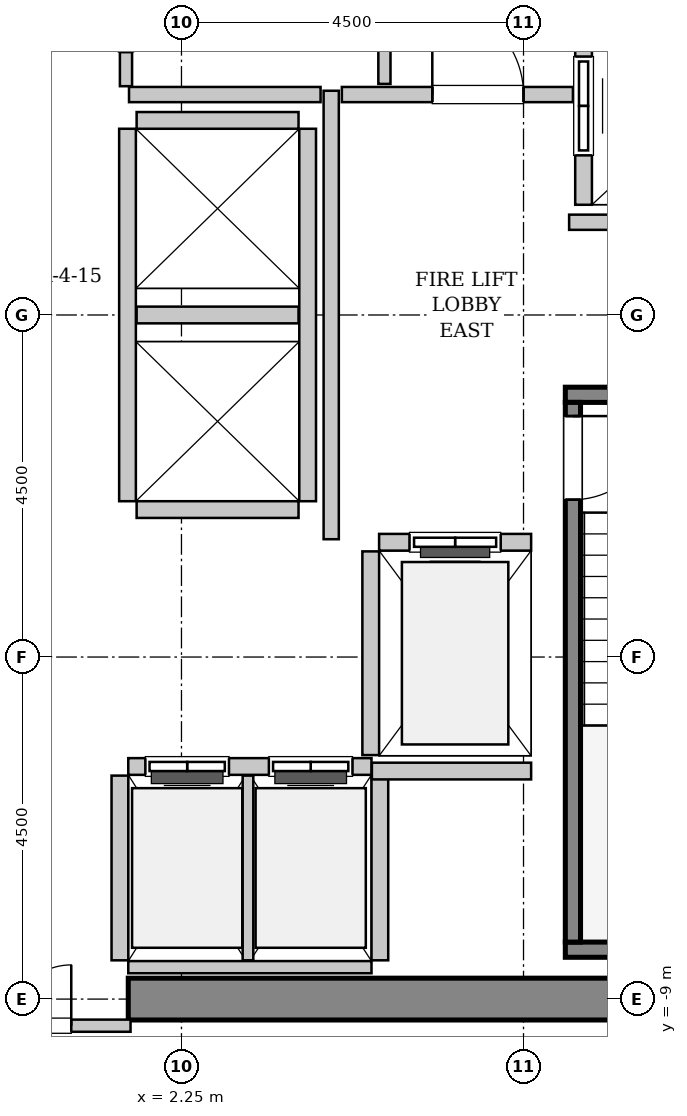
"""IFC4 building model, lengths in metres.
Left out: names, types, materials, properties, quantities, classifications, styles, units other than length and angle.
Written with IfcOpenShell. Run it as: python <this file> out.ifc"""

import sys

from ifc_helpers import new_model, si_unit, direction, frame, frame_2d, origin, place, context, subcontext, project, spatial, rectangle, extrude, source, transform, mapped, element, fill, save


model = new_model("IFC4")
c1 = context("Model", 3, precision=1e-05, world=origin(), true_north=direction((0.0, 1.0)))
c2 = subcontext(c1, "Body", "Model", "MODEL_VIEW")
j1 = project(units=[si_unit("LENGTHUNIT", "METRE"), si_unit("PLANEANGLEUNIT", "RADIAN")], contexts=[c1])
p1 = place(None, origin())
s1 = spatial("IfcSite", under=j1, at=p1, CompositionType="ELEMENT")
p2 = place(p1, origin())
s2 = spatial("IfcBuilding", under=s1, at=p2, CompositionType="ELEMENT")
p3 = place(p2, frame((0.0, 0.0, 171.6)))
s3 = spatial("IfcBuildingStorey", under=s2, at=p3, CompositionType="ELEMENT", Elevation=171.6)
m1 = source(origin(), c2, "Body", "SweptSolid", [
    extrude(rectangle(XDim=9.975, YDim=0.55, at=frame_2d((4.987, 0.0))), origin(), (0.0, 0.0, 1.0), 3.8),
])
p4 = place(p3, frame((1.55, -9.0, 0.0), z_axis=(0.0, 0.0, 1.0), x_axis=(1.0, 0.0, 0.0)))
e1 = element("IfcWall", 1, at=p4, inside=s3, PredefinedType="SHEAR", context=c2, shape_type="MappedRepresentation", body=[
    mapped(m1, transform((0.0, 0.0, 0.0), x_axis=(1.0, 0.0, 0.0), y_axis=(0.0, 1.0, 0.0), z_axis=(0.0, 0.0, 1.0), scale=1.0)),
])
m2 = source(origin(), c2, "Body", "SweptSolid", [
    extrude(rectangle(XDim=3.4, YDim=0.2, at=frame_2d((1.7, 0.0))), origin(), (0.0, 0.0, 1.0), 3.8),
])
p5 = place(p3, frame((7.3, -1.05, 0.0), z_axis=(0.0, 0.0, 1.0), x_axis=(1.0, 0.0, 0.0)))
e2 = element("IfcWall", 2, at=p5, inside=s3, PredefinedType="SOLIDWALL", context=c2, shape_type="MappedRepresentation", body=[
    mapped(m2, transform((0.0, 0.0, 0.0), x_axis=(1.0, 0.0, 0.0), y_axis=(0.0, 1.0, 0.0), z_axis=(0.0, 0.0, 1.0), scale=1.0)),
])
m3 = source(origin(), c2, "Body", "SweptSolid", [
    extrude(rectangle(XDim=3.68, YDim=0.2, at=frame_2d((1.84, 0.0))), origin(), (0.0, 0.0, 1.0), 3.8),
])
p6 = place(p3, frame((7.3, -8.35, 0.0), z_axis=(0.0, 0.0, 1.0), x_axis=(1.0, 0.0, 0.0)))
e3 = element("IfcWall", 3, at=p6, inside=s3, PredefinedType="SOLIDWALL", context=c2, shape_type="MappedRepresentation", body=[
    mapped(m3, transform((0.0, 0.0, 0.0), x_axis=(1.0, 0.0, 0.0), y_axis=(0.0, 1.0, 0.0), z_axis=(0.0, 0.0, 1.0), scale=1.0)),
])
m4 = source(origin(), c2, "Body", "SweptSolid", [
    extrude(rectangle(XDim=7.1, YDim=0.2, at=frame_2d((3.55, 0.0))), origin(), (0.0, 0.0, 1.0), 3.8),
])
p7 = place(p3, frame((7.4, -1.15, 0.0), z_axis=(0.0, 0.0, 1.0), x_axis=(0.0, -1.0, 0.0)))
e4 = element("IfcWall", 4, at=p7, inside=s3, PredefinedType="SOLIDWALL", context=c2, shape_type="MappedRepresentation", body=[
    mapped(m4, transform((0.0, 0.0, 0.0), x_axis=(1.0, 0.0, 0.0), y_axis=(0.0, 1.0, 0.0), z_axis=(0.0, 0.0, 1.0), scale=1.0)),
])
p8 = place(p7, frame((0.18, 0.0, 0.0)))
e5 = element("IfcOpeningElement", 5, at=p8, cuts=e4, PredefinedType="OPENING", context=c2, shape_type="SweptSolid", body=[
    extrude(rectangle(XDim=1.1, YDim=2.15, at=frame_2d((0.55, 1.075))), frame((0.0, 0.11, 0.0), z_axis=(0.0, -1.0, 0.0), x_axis=(1.0, 0.0, 0.0)), (0.0, 0.0, 1.0), 0.22),
])
m5 = source(origin(), c2, "Body", "SweptSolid", [
    extrude(rectangle(XDim=2.0, YDim=0.22, at=frame_2d((1.0, 0.0))), origin(), (0.0, 0.0, 1.0), 3.535),
])
p9 = place(p3, frame((6.85, -2.99, 0.0), z_axis=(0.0, 0.0, 1.0), x_axis=(-1.0, 0.0, 0.0)))
e6 = element("IfcWall", 6, at=p9, inside=s3, PredefinedType="SOLIDWALL", context=c2, shape_type="MappedRepresentation", body=[
    mapped(m5, transform((0.0, 0.0, 0.0), x_axis=(1.0, 0.0, 0.0), y_axis=(0.0, 1.0, 0.0), z_axis=(0.0, 0.0, 1.0), scale=1.0)),
])
p10 = place(p9, frame((0.4, 0.0, 0.0)))
e7 = element("IfcOpeningElement", 7, at=p10, cuts=e6, PredefinedType="OPENING", context=c2, shape_type="SweptSolid", body=[
    extrude(rectangle(XDim=1.2, YDim=2.2, at=frame_2d((0.6, 1.1))), frame((0.0, 0.12, 0.0), z_axis=(0.0, -1.0, 0.0), x_axis=(1.0, 0.0, 0.0)), (0.0, 0.0, 1.0), 0.24),
])
m6 = source(origin(), c2, "Body", "SweptSolid", [
    extrude(rectangle(XDim=2.68, YDim=0.22, at=frame_2d((1.34, 0.0))), origin(), (0.0, 0.0, 1.0), 3.535),
])
p11 = place(p3, frame((4.74, -3.11, 0.0), z_axis=(0.0, 0.0, 1.0), x_axis=(0.0, -1.0, 0.0)))
e8 = element("IfcWall", 8, at=p11, inside=s3, PredefinedType="SOLIDWALL", context=c2, shape_type="MappedRepresentation", body=[
    mapped(m6, transform((0.0, 0.0, 0.0), x_axis=(1.0, 0.0, 0.0), y_axis=(0.0, 1.0, 0.0), z_axis=(0.0, 0.0, 1.0), scale=1.0)),
])
m7 = source(origin(), c2, "Body", "SweptSolid", [
    extrude(rectangle(XDim=5.45, YDim=0.22, at=frame_2d((2.725, 0.0))), origin(), (0.0, 0.0, 1.0), 3.535),
])
p12 = place(p3, frame((7.54, 6.9, 0.0), z_axis=(0.0, 0.0, 1.0), x_axis=(0.0, -1.0, 0.0)))
e9 = element("IfcWall", 9, at=p12, inside=s3, PredefinedType="SOLIDWALL", context=c2, shape_type="MappedRepresentation", body=[
    mapped(m7, transform((0.0, 0.0, 0.0), x_axis=(1.0, 0.0, 0.0), y_axis=(0.0, 1.0, 0.0), z_axis=(0.0, 0.0, 1.0), scale=1.0)),
])
p13 = place(p12, frame((3.5, 0.0, 0.0)))
e10 = element("IfcOpeningElement", 10, at=p13, cuts=e9, PredefinedType="OPENING", context=c2, shape_type="SweptSolid", body=[
    extrude(rectangle(XDim=1.3, YDim=2.3, at=frame_2d((0.65, 1.15))), frame((0.0, 0.12, 0.0), z_axis=(0.0, -1.0, 0.0), x_axis=(1.0, 0.0, 0.0)), (0.0, 0.0, 1.0), 0.24),
])
p14 = place(p12, frame((0.65, 0.0, 0.0)))
e11 = element("IfcOpeningElement", 11, at=p14, cuts=e9, PredefinedType="OPENING", context=c2, shape_type="SweptSolid", body=[
    extrude(rectangle(XDim=1.3, YDim=2.3, at=frame_2d((0.65, 1.15))), frame((0.0, 0.12, 0.0), z_axis=(0.0, -1.0, 0.0), x_axis=(1.0, 0.0, 0.0)), (0.0, 0.0, 1.0), 0.24),
])
m8 = source(origin(), c2, "Body", "SweptSolid", [
    extrude(rectangle(XDim=3.2, YDim=0.22, at=frame_2d((1.6, 0.0))), origin(), (0.0, 0.0, 1.0), 3.535),
])
p15 = place(p3, frame((4.75, -5.94, 0.0), z_axis=(0.0, 0.0, 1.0), x_axis=(-1.0, 0.0, 0.0)))
e12 = element("IfcWall", 12, at=p15, inside=s3, PredefinedType="SOLIDWALL", context=c2, shape_type="MappedRepresentation", body=[
    mapped(m8, transform((0.0, 0.0, 0.0), x_axis=(1.0, 0.0, 0.0), y_axis=(0.0, 1.0, 0.0), z_axis=(0.0, 0.0, 1.0), scale=1.0)),
])
p16 = place(p15, frame((1.875, 0.0, 0.0)))
e13 = element("IfcOpeningElement", 13, at=p16, cuts=e12, PredefinedType="OPENING", context=c2, shape_type="SweptSolid", body=[
    extrude(rectangle(XDim=1.1, YDim=2.2, at=frame_2d((0.55, 1.1))), frame((0.0, 0.12, 0.0), z_axis=(0.0, -1.0, 0.0), x_axis=(1.0, 0.0, 0.0)), (0.0, 0.0, 1.0), 0.24),
])
p17 = place(p15, frame((0.25, 0.0, 0.0)))
e14 = element("IfcOpeningElement", 14, at=p17, cuts=e12, PredefinedType="OPENING", context=c2, shape_type="SweptSolid", body=[
    extrude(rectangle(XDim=1.1, YDim=2.2, at=frame_2d((0.55, 1.1))), frame((0.0, 0.12, 0.0), z_axis=(0.0, -1.0, 0.0), x_axis=(1.0, 0.0, 0.0)), (0.0, 0.0, 1.0), 0.24),
])
m9 = source(origin(), c2, "Body", "SweptSolid", [
    extrude(rectangle(XDim=3.2, YDim=0.16, at=frame_2d((1.6, 0.0))), origin(), (0.0, 0.0, 1.0), 2.425),
])
p18 = place(p3, frame((1.55, -8.58, 0.0), z_axis=(0.0, 0.0, 1.0), x_axis=(1.0, 0.0, 0.0)))
e15 = element("IfcWall", 15, at=p18, inside=s3, PredefinedType="PARTITIONING", context=c2, shape_type="MappedRepresentation", body=[
    mapped(m9, transform((0.0, 0.0, 0.0), x_axis=(1.0, 0.0, 0.0), y_axis=(0.0, 1.0, 0.0), z_axis=(0.0, 0.0, 1.0), scale=1.0)),
])
m10 = source(origin(), c2, "Body", "SweptSolid", [
    extrude(rectangle(XDim=2.43, YDim=0.22, at=frame_2d((1.215, 0.0))), origin(), (0.0, 0.0, 1.0), 3.535),
])
p19 = place(p3, frame((1.44, -6.06, 0.0), z_axis=(0.0, 0.0, 1.0), x_axis=(0.0, -1.0, 0.0)))
e16 = element("IfcWall", 16, at=p19, inside=s3, PredefinedType="SOLIDWALL", context=c2, shape_type="MappedRepresentation", body=[
    mapped(m10, transform((0.0, 0.0, 0.0), x_axis=(1.0, 0.0, 0.0), y_axis=(0.0, 1.0, 0.0), z_axis=(0.0, 0.0, 1.0), scale=1.0)),
])
m11 = source(origin(), c2, "Body", "SweptSolid", [
    extrude(rectangle(XDim=2.43, YDim=0.14, at=frame_2d((1.215, 0.0))), origin(), (0.0, 0.0, 1.0), 3.535),
])
p20 = place(p3, frame((3.125, -8.49, 0.0), z_axis=(0.0, 0.0, 1.0), x_axis=(0.0, 1.0, 0.0)))
e17 = element("IfcWall", 17, at=p20, inside=s3, PredefinedType="PARTITIONING", context=c2, shape_type="MappedRepresentation", body=[
    mapped(m11, transform((0.0, 0.0, 0.0), x_axis=(1.0, 0.0, 0.0), y_axis=(0.0, 1.0, 0.0), z_axis=(0.0, 0.0, 1.0), scale=1.0)),
])
p21 = place(p3, frame((4.86, -8.49, 0.0), z_axis=(0.0, 0.0, 1.0), x_axis=(0.0, 1.0, 0.0)))
e18 = element("IfcWall", 18, at=p21, inside=s3, PredefinedType="SOLIDWALL", context=c2, shape_type="MappedRepresentation", body=[
    mapped(m10, transform((0.0, 0.0, 0.0), x_axis=(1.0, 0.0, 0.0), y_axis=(0.0, 1.0, 0.0), z_axis=(0.0, 0.0, 1.0), scale=1.0)),
])
m12 = source(origin(), c2, "Body", "SweptSolid", [
    extrude(rectangle(XDim=4.9, YDim=0.22, at=frame_2d((2.45, 0.0))), origin(), (0.0, 0.0, 1.0), 3.535),
])
for number, where, z_axis, x_axis in (
    (19, (1.54, 2.45, 0.0), (0.0, 0.0, 1.0), (0.0, -1.0, 0.0)),
    (20, (3.91, -2.45, 0.0), (0.0, 0.0, 1.0), (0.0, 1.0, 0.0)),
):
    element("IfcWall", number, at=place(p3, frame(where, z_axis=z_axis, x_axis=x_axis)), inside=s3, PredefinedType="SOLIDWALL", context=c2, shape_type="MappedRepresentation", body=[
        mapped(m12, transform((0.0, 0.0, 0.0), x_axis=(1.0, 0.0, 0.0), y_axis=(0.0, 1.0, 0.0), z_axis=(0.0, 0.0, 1.0), scale=1.0)),
    ])
m13 = source(origin(), c2, "Body", "SweptSolid", [
    extrude(rectangle(XDim=2.13, YDim=0.22, at=frame_2d((1.065, 0.0))), origin(), (0.0, 0.0, 1.0), 3.535),
])
for number, where, z_axis, x_axis in (
    (21, (1.66, -2.56, 0.0), (0.0, 0.0, 1.0), (1.0, 0.0, 0.0)),
    (22, (1.66, 0.0, 0.0), (0.0, 0.0, 1.0), (1.0, 0.0, 0.0)),
    (23, (3.79, 2.56, 0.0), (0.0, 0.0, 1.0), (-1.0, 0.0, 0.0)),
):
    element("IfcWall", number, at=place(p3, frame(where, z_axis=z_axis, x_axis=x_axis)), inside=s3, PredefinedType="SOLIDWALL", context=c2, shape_type="MappedRepresentation", body=[
        mapped(m13, transform((0.0, 0.0, 0.0), x_axis=(1.0, 0.0, 0.0), y_axis=(0.0, 1.0, 0.0), z_axis=(0.0, 0.0, 1.0), scale=1.0)),
    ])
m14 = source(origin(), c2, "Body", "SweptSolid", [
    extrude(rectangle(XDim=2.095, YDim=0.22, at=frame_2d((1.048, 0.0))), origin(), (0.0, 0.0, 1.0), 3.535),
])
p22 = place(p3, frame((4.755, -6.0, 0.0), z_axis=(0.0, 0.0, 1.0), x_axis=(1.0, 0.0, 0.0)))
e24 = element("IfcWall", 24, at=p22, inside=s3, PredefinedType="SOLIDWALL", context=c2, shape_type="MappedRepresentation", body=[
    mapped(m14, transform((0.0, 0.0, 0.0), x_axis=(1.0, 0.0, 0.0), y_axis=(0.0, 1.0, 0.0), z_axis=(0.0, 0.0, 1.0), scale=1.0)),
])
m15 = source(origin(), c2, "Body", "SweptSolid", [
    extrude(rectangle(XDim=5.9, YDim=0.2, at=frame_2d((2.95, 0.0))), origin(), (0.0, 0.0, 1.0), 3.535),
])
p23 = place(p3, frame((4.22, -2.95, 0.0), z_axis=(0.0, 0.0, 1.0), x_axis=(0.0, 1.0, 0.0)))
e25 = element("IfcWall", 25, at=p23, inside=s3, PredefinedType="PARTITIONING", context=c2, shape_type="MappedRepresentation", body=[
    mapped(m15, transform((0.0, 0.0, 0.0), x_axis=(1.0, 0.0, 0.0), y_axis=(0.0, 1.0, 0.0), z_axis=(0.0, 0.0, 1.0), scale=1.0)),
])
m16 = source(origin(), c2, "Body", "SweptSolid", [
    extrude(rectangle(XDim=2.52, YDim=0.2, at=frame_2d((1.26, 0.0))), origin(), (0.0, 0.0, 1.0), 3.535),
])
p24 = place(p3, frame((1.56, 2.9, 0.0), z_axis=(0.0, 0.0, 1.0), x_axis=(1.0, 0.0, 0.0)))
e26 = element("IfcWall", 26, at=p24, inside=s3, PredefinedType="PARTITIONING", context=c2, shape_type="MappedRepresentation", body=[
    mapped(m16, transform((0.0, 0.0, 0.0), x_axis=(1.0, 0.0, 0.0), y_axis=(0.0, 1.0, 0.0), z_axis=(0.0, 0.0, 1.0), scale=1.0)),
])
m17 = source(origin(), c2, "Body", "SweptSolid", [
    extrude(rectangle(XDim=3.04, YDim=0.2, at=frame_2d((1.52, 0.0))), origin(), (0.0, 0.0, 1.0), 3.535),
])
p25 = place(p3, frame((4.36, 2.9, 0.0), z_axis=(0.0, 0.0, 1.0), x_axis=(1.0, 0.0, 0.0)))
e27 = element("IfcWall", 27, at=p25, inside=s3, PredefinedType="PARTITIONING", context=c2, shape_type="MappedRepresentation", body=[
    mapped(m17, transform((0.0, 0.0, 0.0), x_axis=(1.0, 0.0, 0.0), y_axis=(0.0, 1.0, 0.0), z_axis=(0.0, 0.0, 1.0), scale=1.0)),
])
p26 = place(p25, frame((1.19, 0.0, 0.0)))
e28 = element("IfcOpeningElement", 28, at=p26, cuts=e27, PredefinedType="OPENING", context=c2, shape_type="SweptSolid", body=[
    extrude(rectangle(XDim=1.2, YDim=2.15, at=frame_2d((0.6, 1.075))), frame((0.0, 0.11, 0.0), z_axis=(0.0, -1.0, 0.0), x_axis=(1.0, 0.0, 0.0)), (0.0, 0.0, 1.0), 0.22),
])
m18 = source(origin(), c2, "Body", "SweptSolid", [
    extrude(rectangle(XDim=4.11, YDim=0.2, at=frame_2d((2.055, 0.0))), origin(), (0.0, 0.0, 1.0), 3.535),
])
p27 = place(p3, frame((7.35, 1.22, 0.0), z_axis=(0.0, 0.0, 1.0), x_axis=(1.0, 0.0, 0.0)))
e29 = element("IfcWall", 29, at=p27, inside=s3, PredefinedType="PARTITIONING", context=c2, shape_type="MappedRepresentation", body=[
    mapped(m18, transform((0.0, 0.0, 0.0), x_axis=(1.0, 0.0, 0.0), y_axis=(0.0, 1.0, 0.0), z_axis=(0.0, 0.0, 1.0), scale=1.0)),
])
m19 = source(origin(), c2, "Body", "SweptSolid", [
    extrude(rectangle(XDim=3.16, YDim=0.16, at=frame_2d((1.58, 0.0))), origin(), (0.0, 0.0, 1.0), 2.425),
])
p28 = place(p3, frame((-1.58, -9.35, 0.0), z_axis=(0.0, 0.0, 1.0), x_axis=(1.0, 0.0, 0.0)))
e30 = element("IfcWall", 30, at=p28, inside=s3, PredefinedType="PARTITIONING", context=c2, shape_type="MappedRepresentation", body=[
    mapped(m19, transform((0.0, 0.0, 0.0), x_axis=(1.0, 0.0, 0.0), y_axis=(0.0, 1.0, 0.0), z_axis=(0.0, 0.0, 1.0), scale=1.0)),
])
p29 = place(p28, frame((0.78, 0.0, 0.0)))
e31 = element("IfcOpeningElement", 31, at=p29, cuts=e30, PredefinedType="OPENING", context=c2, shape_type="SweptSolid", body=[
    extrude(rectangle(XDim=1.6, YDim=2.3, at=frame_2d((0.8, 1.15))), frame((0.0, 0.09, 0.0), z_axis=(0.0, -1.0, 0.0), x_axis=(1.0, 0.0, 0.0)), (0.0, 0.0, 1.0), 0.18),
])
m20 = source(origin(), c2, "Body", "SweptSolid", [
    extrude(rectangle(XDim=5.45, YDim=0.16, at=frame_2d((2.725, 0.0))), origin(), (0.0, 0.0, 1.0), 3.535),
])
p30 = place(p3, frame((4.92, 3.04, 0.0), z_axis=(0.0, 0.0, 1.0), x_axis=(0.0, 1.0, 0.0)))
e32 = element("IfcWall", 32, at=p30, inside=s3, PredefinedType="PARTITIONING", context=c2, shape_type="MappedRepresentation", body=[
    mapped(m20, transform((0.0, 0.0, 0.0), x_axis=(1.0, 0.0, 0.0), y_axis=(0.0, 1.0, 0.0), z_axis=(0.0, 0.0, 1.0), scale=1.0)),
])
m21 = source(origin(), c2, "Body", "SweptSolid", [
    extrude(rectangle(XDim=1.75, YDim=0.16, at=frame_2d((0.875, 0.0))), origin(), (0.0, 0.0, 1.0), 3.535),
])
p31 = place(p3, frame((1.52, 3.01, 0.0), z_axis=(0.0, 0.0, 1.0), x_axis=(0.0, 1.0, 0.0)))
e33 = element("IfcWall", 33, at=p31, inside=s3, PredefinedType="PARTITIONING", context=c2, shape_type="MappedRepresentation", body=[
    mapped(m21, transform((0.0, 0.0, 0.0), x_axis=(1.0, 0.0, 0.0), y_axis=(0.0, 1.0, 0.0), z_axis=(0.0, 0.0, 1.0), scale=1.0)),
])
p32 = place(p31, frame((0.45, 0.0, 0.0)))
e34 = element("IfcOpeningElement", 34, at=p32, cuts=e33, PredefinedType="OPENING", context=c2, shape_type="SweptSolid", body=[
    extrude(rectangle(XDim=0.85, YDim=2.1, at=frame_2d((0.425, 1.05))), frame((0.0, 0.09, 0.0), z_axis=(0.0, -1.0, 0.0), x_axis=(1.0, 0.0, 0.0)), (0.0, 0.0, 1.0), 0.18),
])
m22 = source(origin(), c2, "Body", "SweptSolid", [
    extrude(rectangle(XDim=1.1, YDim=2.15, at=frame_2d((0.55, 1.075))), frame((0.0, 0.025, 0.0), z_axis=(0.0, -1.0, 0.0), x_axis=(1.0, 0.0, 0.0)), (0.0, 0.0, 1.0), 0.05),
])
p33 = place(p8, origin())
e35 = element("IfcDoor", 35, at=p33, inside=s3, OperationType="SINGLE_SWING_LEFT", PredefinedType="DOOR", context=c2, shape_type="MappedRepresentation", body=[
    mapped(m22, transform((0.0, 0.0, 0.0), x_axis=(1.0, 0.0, 0.0), y_axis=(0.0, 1.0, 0.0), z_axis=(0.0, 0.0, 1.0), scale=1.0)),
])
fill(e5, e35)
m23 = source(origin(), c2, "Body", "SweptSolid", [
    extrude(rectangle(XDim=1.2, YDim=2.2, at=frame_2d((0.6, 1.1))), frame((0.0, 0.025, 0.0), z_axis=(0.0, -1.0, 0.0), x_axis=(1.0, 0.0, 0.0)), (0.0, 0.0, 1.0), 0.05),
])
p34 = place(p10, origin())
e36 = element("IfcDoor", 36, at=p34, inside=s3, OperationType="SLIDING_TO_LEFT", PredefinedType="DOOR", context=c2, shape_type="MappedRepresentation", body=[
    mapped(m23, transform((0.0, 0.0, 0.0), x_axis=(1.0, 0.0, 0.0), y_axis=(0.0, 1.0, 0.0), z_axis=(0.0, 0.0, 1.0), scale=1.0)),
])
fill(e7, e36)
m24 = source(origin(), c2, "Body", "SweptSolid", [
    extrude(rectangle(XDim=1.3, YDim=2.3, at=frame_2d((0.65, 1.15))), frame((0.0, 0.025, 0.0), z_axis=(0.0, -1.0, 0.0), x_axis=(1.0, 0.0, 0.0)), (0.0, 0.0, 1.0), 0.05),
])
p35 = place(p13, origin())
e37 = element("IfcDoor", 37, at=p35, inside=s3, OperationType="SLIDING_TO_RIGHT", PredefinedType="DOOR", context=c2, shape_type="MappedRepresentation", body=[
    mapped(m24, transform((0.0, 0.0, 0.0), x_axis=(1.0, 0.0, 0.0), y_axis=(0.0, 1.0, 0.0), z_axis=(0.0, 0.0, 1.0), scale=1.0)),
])
fill(e10, e37)
m25 = source(origin(), c2, "Body", "SweptSolid", [
    extrude(rectangle(XDim=1.1, YDim=2.2, at=frame_2d((0.55, 1.1))), frame((0.0, 0.025, 0.0), z_axis=(0.0, -1.0, 0.0), x_axis=(1.0, 0.0, 0.0)), (0.0, 0.0, 1.0), 0.05),
])
p36 = place(p16, origin())
e38 = element("IfcDoor", 38, at=p36, inside=s3, OperationType="DOUBLE_DOOR_SLIDING", PredefinedType="DOOR", context=c2, shape_type="MappedRepresentation", body=[
    mapped(m25, transform((0.0, 0.0, 0.0), x_axis=(1.0, 0.0, 0.0), y_axis=(0.0, 1.0, 0.0), z_axis=(0.0, 0.0, 1.0), scale=1.0)),
])
fill(e13, e38)
p37 = place(p17, origin())
e39 = element("IfcDoor", 39, at=p37, inside=s3, OperationType="DOUBLE_DOOR_SLIDING", PredefinedType="DOOR", context=c2, shape_type="MappedRepresentation", body=[
    mapped(m25, transform((0.0, 0.0, 0.0), x_axis=(1.0, 0.0, 0.0), y_axis=(0.0, 1.0, 0.0), z_axis=(0.0, 0.0, 1.0), scale=1.0)),
])
fill(e14, e39)
m26 = source(origin(), c2, "Body", "SweptSolid", [
    extrude(rectangle(XDim=1.2, YDim=2.15, at=frame_2d((0.6, 1.075))), frame((0.0, 0.025, 0.0), z_axis=(0.0, -1.0, 0.0), x_axis=(1.0, 0.0, 0.0)), (0.0, 0.0, 1.0), 0.05),
])
p38 = place(p26, origin())
e40 = element("IfcDoor", 40, at=p38, inside=s3, OperationType="SINGLE_SWING_LEFT", PredefinedType="DOOR", context=c2, shape_type="MappedRepresentation", body=[
    mapped(m26, transform((0.0, 0.0, 0.0), x_axis=(1.0, 0.0, 0.0), y_axis=(0.0, 1.0, 0.0), z_axis=(0.0, 0.0, 1.0), scale=1.0)),
])
fill(e28, e40)
m27 = source(origin(), c2, "Body", "SweptSolid", [
    extrude(rectangle(XDim=1.6, YDim=2.3, at=frame_2d((0.8, 1.15))), frame((0.0, 0.025, 0.0), z_axis=(0.0, -1.0, 0.0), x_axis=(1.0, 0.0, 0.0)), (0.0, 0.0, 1.0), 0.05),
])
p39 = place(p29, origin())
e41 = element("IfcDoor", 41, at=p39, inside=s3, OperationType="DOUBLE_DOOR_SINGLE_SWING", PredefinedType="DOOR", context=c2, shape_type="MappedRepresentation", body=[
    mapped(m27, transform((0.0, 0.0, 0.0), x_axis=(1.0, 0.0, 0.0), y_axis=(0.0, 1.0, 0.0), z_axis=(0.0, 0.0, 1.0), scale=1.0)),
])
fill(e31, e41)
save(model, sys.argv[1])
